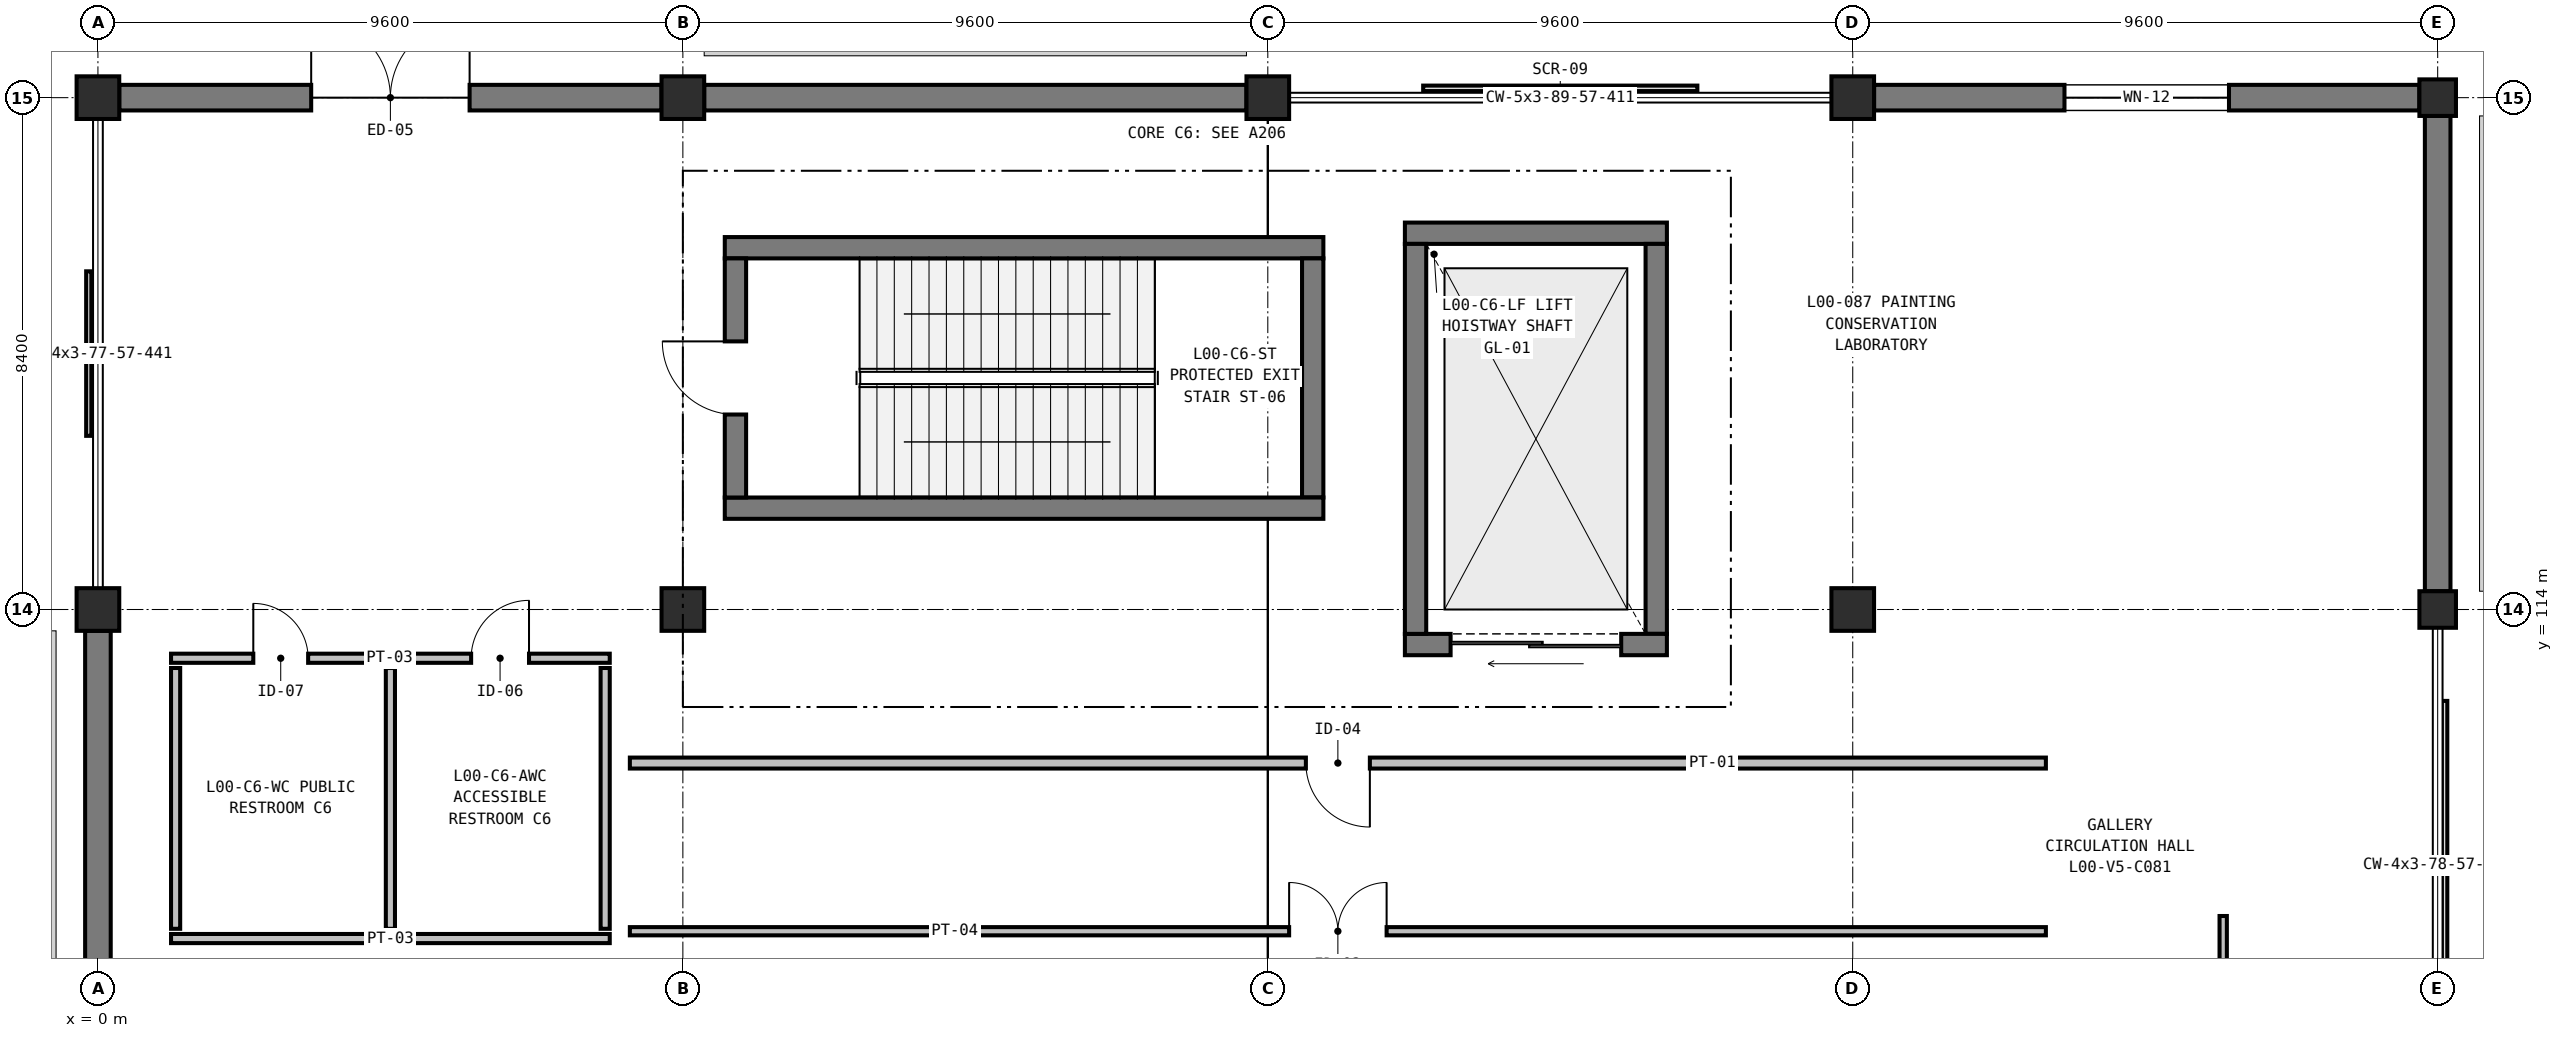
"""IFC4 building model, lengths in metres.
Left out: names, types, materials, properties, quantities, classifications, styles, units other than length and angle.
Written with IfcOpenShell. Run it as: python <this file> out.ifc"""

import sys

from ifc_helpers import new_model, si_unit, direction, frame, frame_2d, origin, origin_2d, place, context, subcontext, project, spatial, rectangle, extrude, element, fill, save


model = new_model("IFC4")
c1 = context("Model", 3, precision=1e-05, world=origin(), true_north=direction((0.0, 1.0)))
c2 = subcontext(c1, "Body", "Model", "MODEL_VIEW")
j1 = project(units=[si_unit("LENGTHUNIT", "METRE"), si_unit("PLANEANGLEUNIT", "RADIAN")], contexts=[c1])
p1 = place(None, origin())
s1 = spatial("IfcSite", under=j1, at=p1, CompositionType="ELEMENT")
p2 = place(p1, origin())
s2 = spatial("IfcBuilding", under=s1, at=p2, CompositionType="ELEMENT")
p3 = place(p2, origin())
s3 = spatial("IfcBuildingStorey", under=s2, at=p3, CompositionType="ELEMENT", Elevation=0.0)
for number, where, z_axis, x_axis in (
    (1, (0.0, 114.0, 0.0), (0.0, 0.0, 1.0), (1.0, 0.0, 0.0)),
    (2, (0.0, 122.4, 0.0), (0.0, 0.0, 1.0), (1.0, 0.0, 0.0)),
    (3, (9.6, 114.0, 0.0), (0.0, 0.0, 1.0), (1.0, 0.0, 0.0)),
    (4, (9.6, 122.4, 0.0), (0.0, 0.0, 1.0), (1.0, 0.0, 0.0)),
    (5, (19.2, 122.4, 0.0), (0.0, 0.0, 1.0), (1.0, 0.0, 0.0)),
    (6, (28.8, 114.0, 0.0), (0.0, 0.0, 1.0), (1.0, 0.0, 0.0)),
    (7, (28.8, 122.4, 0.0), (0.0, 0.0, 1.0), (1.0, 0.0, 0.0)),
):
    element("IfcColumn", number, at=place(p3, frame(where, z_axis=z_axis, x_axis=x_axis)), inside=s3, PredefinedType="COLUMN", context=c2, shape_type="SweptSolid", body=[
        extrude(rectangle(XDim=0.7, YDim=0.7, at=origin_2d()), origin(), (0.0, 0.0, 1.0), 6.0),
    ])
for number, where, z_axis, x_axis in (
    (8, (38.4, 114.0, 0.0), (0.0, 0.0, 1.0), (1.0, 0.0, 0.0)),
    (9, (38.4, 122.4, 0.0), (0.0, 0.0, 1.0), (1.0, 0.0, 0.0)),
):
    element("IfcColumn", number, at=place(p3, frame(where, z_axis=z_axis, x_axis=x_axis)), inside=s3, PredefinedType="COLUMN", context=c2, shape_type="SweptSolid", body=[
        extrude(rectangle(XDim=0.6, YDim=0.6, at=origin_2d()), origin(), (0.0, 0.0, 1.0), 6.0),
    ])
p4 = place(p3, frame((0.35, 122.4, 0.0), z_axis=(0.0, 0.0, 1.0), x_axis=(1.0, 0.0, 0.0)))
e10 = element("IfcWall", 10, at=p4, inside=s3, PredefinedType="SOLIDWALL", context=c2, shape_type="SweptSolid", body=[
    extrude(rectangle(XDim=8.9, YDim=0.42, at=frame_2d((4.45, 0.0))), origin(), (0.0, 0.0, 1.0), 5.68),
])
p5 = place(p4, frame((3.15, 0.0, 0.0)))
e11 = element("IfcOpeningElement", 11, at=p5, cuts=e10, PredefinedType="OPENING", context=c2, shape_type="SweptSolid", body=[
    extrude(rectangle(XDim=2.6, YDim=2.45, at=frame_2d((1.3, 1.225))), frame((0.0, 0.22, 0.0), z_axis=(0.0, -1.0, 0.0), x_axis=(1.0, 0.0, 0.0)), (0.0, 0.0, 1.0), 0.44),
])
p6 = place(p3, frame((9.95, 122.4, 0.0), z_axis=(0.0, 0.0, 1.0), x_axis=(1.0, 0.0, 0.0)))
e12 = element("IfcWall", 12, at=p6, inside=s3, PredefinedType="SOLIDWALL", context=c2, shape_type="SweptSolid", body=[
    extrude(rectangle(XDim=8.9, YDim=0.42, at=frame_2d((4.45, 0.0))), origin(), (0.0, 0.0, 1.0), 5.68),
])
p7 = place(p3, frame((29.15, 122.4, 0.0), z_axis=(0.0, 0.0, 1.0), x_axis=(1.0, 0.0, 0.0)))
e13 = element("IfcWall", 13, at=p7, inside=s3, PredefinedType="SOLIDWALL", context=c2, shape_type="SweptSolid", body=[
    extrude(rectangle(XDim=8.95, YDim=0.42, at=frame_2d((4.475, 0.0))), origin(), (0.0, 0.0, 1.0), 5.68),
])
p8 = place(p7, frame((3.125, 0.0, 0.9)))
e14 = element("IfcOpeningElement", 14, at=p8, cuts=e13, PredefinedType="OPENING", context=c2, shape_type="SweptSolid", body=[
    extrude(rectangle(XDim=2.7, YDim=1.8, at=frame_2d((1.35, 0.9))), frame((0.0, 0.22, 0.0), z_axis=(0.0, -1.0, 0.0), x_axis=(1.0, 0.0, 0.0)), (0.0, 0.0, 1.0), 0.44),
])
p9 = place(p3, frame((38.4, 122.1, 0.0), z_axis=(0.0, 0.0, 1.0), x_axis=(0.0, -1.0, 0.0)))
e15 = element("IfcWall", 15, at=p9, inside=s3, PredefinedType="SOLIDWALL", context=c2, shape_type="SweptSolid", body=[
    extrude(rectangle(XDim=7.8, YDim=0.42, at=frame_2d((3.9, 0.0))), origin(), (0.0, 0.0, 1.0), 5.68),
])
p10 = place(p3, frame((0.0, 105.95, 0.0), z_axis=(0.0, 0.0, 1.0), x_axis=(0.0, 1.0, 0.0)))
e16 = element("IfcWall", 16, at=p10, inside=s3, PredefinedType="SOLIDWALL", context=c2, shape_type="SweptSolid", body=[
    extrude(rectangle(XDim=7.7, YDim=0.42, at=frame_2d((3.85, 0.0))), origin(), (0.0, 0.0, 1.0), 5.68),
])
p11 = place(p3, frame((10.288, 119.937, 0.0), z_axis=(0.0, 0.0, 1.0), x_axis=(1.0, 0.0, 0.0)))
e17 = element("IfcWall", 17, at=p11, inside=s3, PredefinedType="SHEAR", context=c2, shape_type="SweptSolid", body=[
    extrude(rectangle(XDim=9.824, YDim=0.35, at=frame_2d((4.912, 0.0))), origin(), (0.0, 0.0, 1.0), 5.68),
])
p12 = place(p3, frame((19.937, 119.762, 0.0), z_axis=(0.0, 0.0, 1.0), x_axis=(0.0, -1.0, 0.0)))
e18 = element("IfcWall", 18, at=p12, inside=s3, PredefinedType="SHEAR", context=c2, shape_type="SweptSolid", body=[
    extrude(rectangle(XDim=3.924, YDim=0.35, at=frame_2d((1.962, 0.0))), origin(), (0.0, 0.0, 1.0), 5.68),
])
p13 = place(p3, frame((20.112, 115.663, 0.0), z_axis=(0.0, 0.0, 1.0), x_axis=(-1.0, 0.0, 0.0)))
e19 = element("IfcWall", 19, at=p13, inside=s3, PredefinedType="SHEAR", context=c2, shape_type="SweptSolid", body=[
    extrude(rectangle(XDim=9.824, YDim=0.35, at=frame_2d((4.912, 0.0))), origin(), (0.0, 0.0, 1.0), 5.68),
])
p14 = place(p3, frame((10.463, 115.838, 0.0), z_axis=(0.0, 0.0, 1.0), x_axis=(0.0, 1.0, 0.0)))
e20 = element("IfcWall", 20, at=p14, inside=s3, PredefinedType="SHEAR", context=c2, shape_type="SweptSolid", body=[
    extrude(rectangle(XDim=3.924, YDim=0.35, at=frame_2d((1.962, 0.0))), origin(), (0.0, 0.0, 1.0), 5.68),
])
p15 = place(p14, frame((1.362, 0.0, 0.0)))
e21 = element("IfcOpeningElement", 21, at=p15, cuts=e20, PredefinedType="OPENING", context=c2, shape_type="SweptSolid", body=[
    extrude(rectangle(XDim=1.2, YDim=2.2, at=frame_2d((0.6, 1.1))), frame((0.0, 0.185, 0.0), z_axis=(0.0, -1.0, 0.0), x_axis=(1.0, 0.0, 0.0)), (0.0, 0.0, 1.0), 0.37),
])
p16 = place(p3, frame((21.45, 120.175, 0.0), z_axis=(0.0, 0.0, 1.0), x_axis=(1.0, 0.0, 0.0)))
e22 = element("IfcWall", 22, at=p16, inside=s3, PredefinedType="SHEAR", context=c2, shape_type="SweptSolid", body=[
    extrude(rectangle(XDim=4.3, YDim=0.35, at=frame_2d((2.15, 0.0))), origin(), (0.0, 0.0, 1.0), 5.68),
])
p17 = place(p3, frame((25.575, 120.0, 0.0), z_axis=(0.0, 0.0, 1.0), x_axis=(0.0, -1.0, 0.0)))
e23 = element("IfcWall", 23, at=p17, inside=s3, PredefinedType="SHEAR", context=c2, shape_type="SweptSolid", body=[
    extrude(rectangle(XDim=6.4, YDim=0.35, at=frame_2d((3.2, 0.0))), origin(), (0.0, 0.0, 1.0), 5.68),
])
p18 = place(p3, frame((25.75, 113.425, 0.0), z_axis=(0.0, 0.0, 1.0), x_axis=(-1.0, 0.0, 0.0)))
e24 = element("IfcWall", 24, at=p18, inside=s3, PredefinedType="SHEAR", context=c2, shape_type="SweptSolid", body=[
    extrude(rectangle(XDim=4.3, YDim=0.35, at=frame_2d((2.15, 0.0))), origin(), (0.0, 0.0, 1.0), 5.68),
])
p19 = place(p18, frame((0.75, 0.0, 0.0)))
e25 = element("IfcOpeningElement", 25, at=p19, cuts=e24, PredefinedType="OPENING", context=c2, shape_type="SweptSolid", body=[
    extrude(rectangle(XDim=2.8, YDim=2.7, at=frame_2d((1.4, 1.35))), frame((0.0, 0.185, 0.0), z_axis=(0.0, -1.0, 0.0), x_axis=(1.0, 0.0, 0.0)), (0.0, 0.0, 1.0), 0.37),
])
p20 = place(p3, frame((21.625, 113.6, 0.0), z_axis=(0.0, 0.0, 1.0), x_axis=(0.0, 1.0, 0.0)))
e26 = element("IfcWall", 26, at=p20, inside=s3, PredefinedType="SHEAR", context=c2, shape_type="SweptSolid", body=[
    extrude(rectangle(XDim=6.4, YDim=0.35, at=frame_2d((3.2, 0.0))), origin(), (0.0, 0.0, 1.0), 5.68),
])
p21 = place(p3, frame((1.2, 113.2, 0.0), z_axis=(0.0, 0.0, 1.0), x_axis=(1.0, 0.0, 0.0)))
e27 = element("IfcWall", 27, at=p21, inside=s3, PredefinedType="PARTITIONING", context=c2, shape_type="SweptSolid", body=[
    extrude(rectangle(XDim=7.2, YDim=0.15, at=frame_2d((3.6, 0.0))), origin(), (0.0, 0.0, 1.0), 5.68),
])
p22 = place(p21, frame((1.35, 0.0, 0.0)))
e28 = element("IfcOpeningElement", 28, at=p22, cuts=e27, PredefinedType="OPENING", context=c2, shape_type="SweptSolid", body=[
    extrude(rectangle(XDim=0.9, YDim=2.1, at=frame_2d((0.45, 1.05))), frame((0.0, 0.085, 0.0), z_axis=(0.0, -1.0, 0.0), x_axis=(1.0, 0.0, 0.0)), (0.0, 0.0, 1.0), 0.17),
])
p23 = place(p21, frame((4.925, 0.0, 0.0)))
e29 = element("IfcOpeningElement", 29, at=p23, cuts=e27, PredefinedType="OPENING", context=c2, shape_type="SweptSolid", body=[
    extrude(rectangle(XDim=0.95, YDim=2.15, at=frame_2d((0.475, 1.075))), frame((0.0, 0.085, 0.0), z_axis=(0.0, -1.0, 0.0), x_axis=(1.0, 0.0, 0.0)), (0.0, 0.0, 1.0), 0.17),
])
p24 = place(p3, frame((1.2, 108.6, 0.0), z_axis=(0.0, 0.0, 1.0), x_axis=(1.0, 0.0, 0.0)))
e30 = element("IfcWall", 30, at=p24, inside=s3, PredefinedType="PARTITIONING", context=c2, shape_type="SweptSolid", body=[
    extrude(rectangle(XDim=7.2, YDim=0.15, at=frame_2d((3.6, 0.0))), origin(), (0.0, 0.0, 1.0), 5.68),
])
for number, where, z_axis, x_axis in (
    (31, (1.275, 108.76, 0.0), (0.0, 0.0, 1.0), (0.0, 1.0, 0.0)),
    (32, (4.8, 108.76, 0.0), (0.0, 0.0, 1.0), (0.0, 1.0, 0.0)),
    (33, (8.325, 108.76, 0.0), (0.0, 0.0, 1.0), (0.0, 1.0, 0.0)),
):
    element("IfcWall", number, at=place(p3, frame(where, z_axis=z_axis, x_axis=x_axis)), inside=s3, PredefinedType="PARTITIONING", context=c2, shape_type="SweptSolid", body=[
        extrude(rectangle(XDim=4.28, YDim=0.15, at=frame_2d((2.14, 0.0))), origin(), (0.0, 0.0, 1.0), 5.055),
    ])
p25 = place(p3, frame((8.73, 108.72, 0.0), z_axis=(0.0, 0.0, 1.0), x_axis=(1.0, 0.0, 0.0)))
e34 = element("IfcWall", 34, at=p25, inside=s3, PredefinedType="PARTITIONING", context=c2, shape_type="SweptSolid", body=[
    extrude(rectangle(XDim=23.24, YDim=0.135, at=frame_2d((11.62, 0.0))), origin(), (0.0, 0.0, 1.0), 4.955),
])
p26 = place(p25, frame((10.82, 0.0, 0.0)))
e35 = element("IfcOpeningElement", 35, at=p26, cuts=e34, PredefinedType="OPENING", context=c2, shape_type="SweptSolid", body=[
    extrude(rectangle(XDim=1.6, YDim=2.35, at=frame_2d((0.8, 1.175))), frame((0.0, 0.077, 0.0), z_axis=(0.0, -1.0, 0.0), x_axis=(1.0, 0.0, 0.0)), (0.0, 0.0, 1.0), 0.155),
])
p27 = place(p3, frame((34.88, 96.23, 0.0), z_axis=(0.0, 0.0, 1.0), x_axis=(0.0, 1.0, 0.0)))
e36 = element("IfcWall", 36, at=p27, inside=s3, PredefinedType="PARTITIONING", context=c2, shape_type="SweptSolid", body=[
    extrude(rectangle(XDim=12.74, YDim=0.12, at=frame_2d((6.37, 0.0))), origin(), (0.0, 0.0, 1.0), 4.905),
])
p28 = place(p27, frame((5.67, 0.0, 0.0)))
e37 = element("IfcOpeningElement", 37, at=p28, cuts=e36, PredefinedType="OPENING", context=c2, shape_type="SweptSolid", body=[
    extrude(rectangle(XDim=1.4, YDim=2.3, at=frame_2d((0.7, 1.15))), frame((0.0, 0.07, 0.0), z_axis=(0.0, -1.0, 0.0), x_axis=(1.0, 0.0, 0.0)), (0.0, 0.0, 1.0), 0.14),
])
p29 = place(p3, frame((31.97, 111.48, 0.0), z_axis=(0.0, 0.0, 1.0), x_axis=(-1.0, 0.0, 0.0)))
e38 = element("IfcWall", 38, at=p29, inside=s3, PredefinedType="PARTITIONING", context=c2, shape_type="SweptSolid", body=[
    extrude(rectangle(XDim=23.24, YDim=0.18, at=frame_2d((11.62, 0.0))), origin(), (0.0, 0.0, 1.0), 4.955),
])
p30 = place(p29, frame((11.095, 0.0, 0.0)))
e39 = element("IfcOpeningElement", 39, at=p30, cuts=e38, PredefinedType="OPENING", context=c2, shape_type="SweptSolid", body=[
    extrude(rectangle(XDim=1.05, YDim=2.2, at=frame_2d((0.525, 1.1))), frame((0.0, 0.1, 0.0), z_axis=(0.0, -1.0, 0.0), x_axis=(1.0, 0.0, 0.0)), (0.0, 0.0, 1.0), 0.2),
])
p31 = place(p5, origin())
e40 = element("IfcDoor", 40, at=p31, inside=s3, OperationType="DOUBLE_DOOR_SINGLE_SWING", PredefinedType="DOOR", context=c2, shape_type="SweptSolid", body=[
    extrude(rectangle(XDim=2.6, YDim=2.45, at=frame_2d((1.3, 1.225))), frame((0.0, 0.025, 0.0), z_axis=(0.0, -1.0, 0.0), x_axis=(1.0, 0.0, 0.0)), (0.0, 0.0, 1.0), 0.05),
])
fill(e11, e40)
p32 = place(p8, origin())
e41 = element("IfcWindow", 41, at=p32, inside=s3, PartitioningType="SINGLE_PANEL", PredefinedType="WINDOW", context=c2, shape_type="SweptSolid", body=[
    extrude(rectangle(XDim=2.7, YDim=1.8, at=frame_2d((1.35, 0.9))), frame((0.0, 0.03, 0.0), z_axis=(0.0, -1.0, 0.0), x_axis=(1.0, 0.0, 0.0)), (0.0, 0.0, 1.0), 0.06),
])
fill(e14, e41)
p33 = place(p15, origin())
e42 = element("IfcDoor", 42, at=p33, inside=s3, OperationType="SINGLE_SWING_RIGHT", PredefinedType="DOOR", context=c2, shape_type="SweptSolid", body=[
    extrude(rectangle(XDim=1.2, YDim=2.2, at=frame_2d((0.6, 1.1))), frame((0.0, 0.025, 0.0), z_axis=(0.0, -1.0, 0.0), x_axis=(1.0, 0.0, 0.0)), (0.0, 0.0, 1.0), 0.05),
])
fill(e21, e42)
p34 = place(p19, origin())
e43 = element("IfcDoor", 43, at=p34, inside=s3, OperationType="DOUBLE_DOOR_SLIDING", PredefinedType="DOOR", context=c2, shape_type="SweptSolid", body=[
    extrude(rectangle(XDim=2.8, YDim=2.7, at=frame_2d((1.4, 1.35))), frame((0.0, 0.025, 0.0), z_axis=(0.0, -1.0, 0.0), x_axis=(1.0, 0.0, 0.0)), (0.0, 0.0, 1.0), 0.05),
])
fill(e25, e43)
p35 = place(p22, origin())
e44 = element("IfcDoor", 44, at=p35, inside=s3, OperationType="SINGLE_SWING_LEFT", PredefinedType="DOOR", context=c2, shape_type="SweptSolid", body=[
    extrude(rectangle(XDim=0.9, YDim=2.1, at=frame_2d((0.45, 1.05))), frame((0.0, 0.025, 0.0), z_axis=(0.0, -1.0, 0.0), x_axis=(1.0, 0.0, 0.0)), (0.0, 0.0, 1.0), 0.05),
])
fill(e28, e44)
p36 = place(p23, origin())
e45 = element("IfcDoor", 45, at=p36, inside=s3, OperationType="SINGLE_SWING_RIGHT", PredefinedType="DOOR", context=c2, shape_type="SweptSolid", body=[
    extrude(rectangle(XDim=0.95, YDim=2.15, at=frame_2d((0.475, 1.075))), frame((0.0, 0.025, 0.0), z_axis=(0.0, -1.0, 0.0), x_axis=(1.0, 0.0, 0.0)), (0.0, 0.0, 1.0), 0.05),
])
fill(e29, e45)
p37 = place(p26, origin())
e46 = element("IfcDoor", 46, at=p37, inside=s3, OperationType="DOUBLE_DOOR_SINGLE_SWING", PredefinedType="DOOR", context=c2, shape_type="SweptSolid", body=[
    extrude(rectangle(XDim=1.6, YDim=2.35, at=frame_2d((0.8, 1.175))), frame((0.0, 0.025, 0.0), z_axis=(0.0, -1.0, 0.0), x_axis=(1.0, 0.0, 0.0)), (0.0, 0.0, 1.0), 0.05),
])
fill(e35, e46)
p38 = place(p30, origin())
e47 = element("IfcDoor", 47, at=p38, inside=s3, OperationType="SINGLE_SWING_LEFT", PredefinedType="DOOR", context=c2, shape_type="SweptSolid", body=[
    extrude(rectangle(XDim=1.05, YDim=2.2, at=frame_2d((0.525, 1.1))), frame((0.0, 0.025, 0.0), z_axis=(0.0, -1.0, 0.0), x_axis=(1.0, 0.0, 0.0)), (0.0, 0.0, 1.0), 0.05),
])
fill(e39, e47)
save(model, sys.argv[1])
